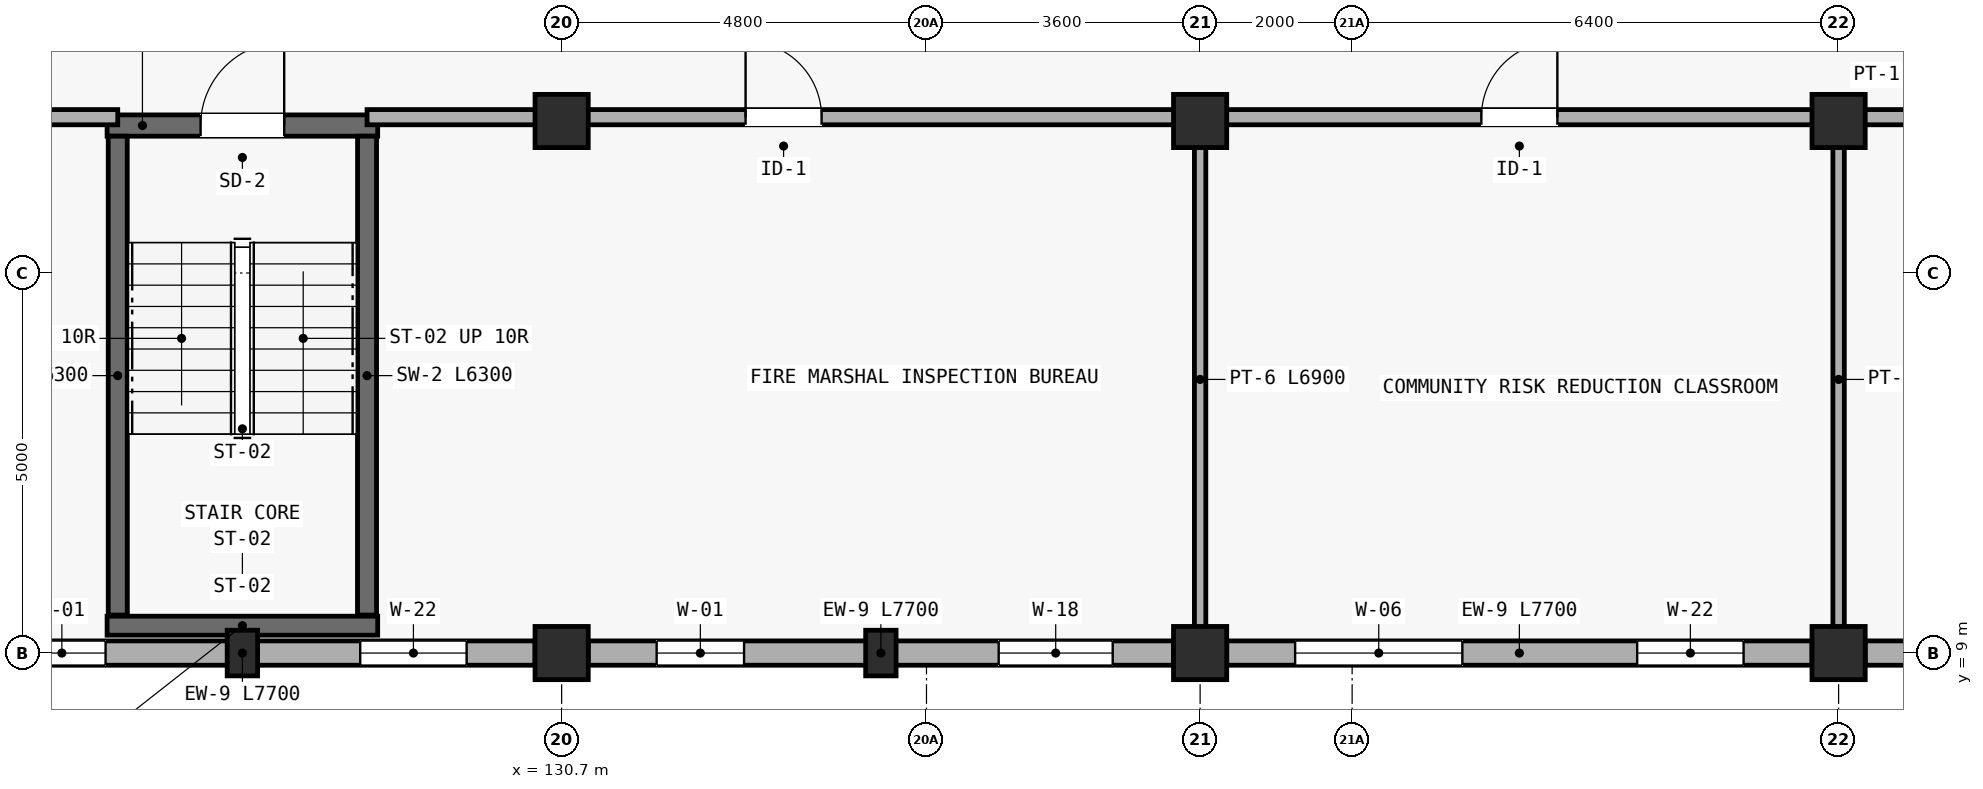
"""IFC4 building model, lengths in metres.
Left out: names, types, materials, properties, quantities, classifications, styles, units other than length and angle.
Written with IfcOpenShell. Run it as: python <this file> out.ifc"""

import sys

from ifc_helpers import new_model, si_unit, direction, frame, frame_2d, origin, origin_2d, place, context, subcontext, project, spatial, rectangle, extrude, element, fill, save


model = new_model("IFC4")
c1 = context("Model", 3, precision=1e-05, world=origin(), true_north=direction((0.0, 1.0)))
c2 = subcontext(c1, "Body", "Model", "MODEL_VIEW")
j1 = project(units=[si_unit("LENGTHUNIT", "METRE"), si_unit("PLANEANGLEUNIT", "RADIAN")], contexts=[c1])
p1 = place(None, origin())
s1 = spatial("IfcSite", under=j1, at=p1, CompositionType="ELEMENT")
p2 = place(p1, origin())
s2 = spatial("IfcBuilding", under=s1, at=p2, CompositionType="ELEMENT")
p3 = place(p2, frame((0.0, 0.0, 5.85)))
s3 = spatial("IfcBuildingStorey", under=s2, at=p3, CompositionType="ELEMENT", Elevation=5.85)
for number, where, z_axis, x_axis in (
    (1, (130.7, 9.0, 0.0), (0.0, 0.0, 1.0), (1.0, 0.0, 0.0)),
    (2, (130.7, 16.0, 0.0), (0.0, 0.0, 1.0), (1.0, 0.0, 0.0)),
    (3, (139.1, 9.0, 0.0), (0.0, 0.0, 1.0), (1.0, 0.0, 0.0)),
    (4, (139.1, 16.0, 0.0), (0.0, 0.0, 1.0), (1.0, 0.0, 0.0)),
    (5, (147.5, 9.0, 0.0), (0.0, 0.0, 1.0), (1.0, 0.0, 0.0)),
    (6, (147.5, 16.0, 0.0), (0.0, 0.0, 1.0), (1.0, 0.0, 0.0)),
):
    element("IfcColumn", number, at=place(p3, frame(where, z_axis=z_axis, x_axis=x_axis)), inside=s3, PredefinedType="COLUMN", context=c2, shape_type="SweptSolid", body=[
        extrude(rectangle(XDim=0.7, YDim=0.7, at=origin_2d()), origin(), (0.0, 0.0, 1.0), 3.45),
    ])
for number, where, z_axis, x_axis in (
    (7, (126.5, 9.0, 0.0), (0.0, 0.0, 1.0), (1.0, 0.0, 0.0)),
    (8, (134.9, 9.0, 0.0), (0.0, 0.0, 1.0), (1.0, 0.0, 0.0)),
):
    element("IfcColumn", number, at=place(p3, frame(where, z_axis=z_axis, x_axis=x_axis)), inside=s3, PredefinedType="PILASTER", context=c2, shape_type="SweptSolid", body=[
        extrude(rectangle(XDim=0.4, YDim=0.6, at=origin_2d()), origin(), (0.0, 0.0, 1.0), 3.45),
    ])
p4 = place(p3, frame((122.65, 9.0, 0.0), z_axis=(0.0, 0.0, 1.0), x_axis=(1.0, 0.0, 0.0)))
e9 = element("IfcWall", 9, at=p4, inside=s3, PredefinedType="STANDARD", context=c2, shape_type="SweptSolid", body=[
    extrude(rectangle(XDim=7.7, YDim=0.32, at=frame_2d((3.85, 0.0))), origin(), (0.0, 0.0, 1.0), 2.64),
])
p5 = place(p4, frame((0.9, 0.0, 0.75)))
e10 = element("IfcOpeningElement", 10, at=p5, cuts=e9, PredefinedType="OPENING", context=c2, shape_type="SweptSolid", body=[
    extrude(rectangle(XDim=1.15, YDim=1.45, at=frame_2d((0.575, 0.725))), frame((0.0, 0.17, 0.0), z_axis=(0.0, -1.0, 0.0), x_axis=(1.0, 0.0, 0.0)), (0.0, 0.0, 1.0), 0.34),
])
p6 = place(p4, frame((5.4, 0.0, 0.75)))
e11 = element("IfcOpeningElement", 11, at=p6, cuts=e9, PredefinedType="OPENING", context=c2, shape_type="SweptSolid", body=[
    extrude(rectangle(XDim=1.4, YDim=1.45, at=frame_2d((0.7, 0.725))), frame((0.0, 0.17, 0.0), z_axis=(0.0, -1.0, 0.0), x_axis=(1.0, 0.0, 0.0)), (0.0, 0.0, 1.0), 0.34),
])
p7 = place(p3, frame((131.05, 9.0, 0.0), z_axis=(0.0, 0.0, 1.0), x_axis=(1.0, 0.0, 0.0)))
e12 = element("IfcWall", 12, at=p7, inside=s3, PredefinedType="STANDARD", context=c2, shape_type="SweptSolid", body=[
    extrude(rectangle(XDim=7.7, YDim=0.32, at=frame_2d((3.85, 0.0))), origin(), (0.0, 0.0, 1.0), 2.64),
])
p8 = place(p7, frame((0.9, 0.0, 0.75)))
e13 = element("IfcOpeningElement", 13, at=p8, cuts=e12, PredefinedType="OPENING", context=c2, shape_type="SweptSolid", body=[
    extrude(rectangle(XDim=1.15, YDim=1.45, at=frame_2d((0.575, 0.725))), frame((0.0, 0.17, 0.0), z_axis=(0.0, -1.0, 0.0), x_axis=(1.0, 0.0, 0.0)), (0.0, 0.0, 1.0), 0.34),
])
p9 = place(p7, frame((5.4, 0.0, 0.75)))
e14 = element("IfcOpeningElement", 14, at=p9, cuts=e12, PredefinedType="OPENING", context=c2, shape_type="SweptSolid", body=[
    extrude(rectangle(XDim=1.5, YDim=1.4, at=frame_2d((0.75, 0.7))), frame((0.0, 0.17, 0.0), z_axis=(0.0, -1.0, 0.0), x_axis=(1.0, 0.0, 0.0)), (0.0, 0.0, 1.0), 0.34),
])
p10 = place(p3, frame((139.45, 9.0, 0.0), z_axis=(0.0, 0.0, 1.0), x_axis=(1.0, 0.0, 0.0)))
e15 = element("IfcWall", 15, at=p10, inside=s3, PredefinedType="STANDARD", context=c2, shape_type="SweptSolid", body=[
    extrude(rectangle(XDim=7.7, YDim=0.32, at=frame_2d((3.85, 0.0))), origin(), (0.0, 0.0, 1.0), 2.64),
])
p11 = place(p10, frame((0.9, 0.0, 0.75)))
e16 = element("IfcOpeningElement", 16, at=p11, cuts=e15, PredefinedType="OPENING", context=c2, shape_type="SweptSolid", body=[
    extrude(rectangle(XDim=2.2, YDim=1.45, at=frame_2d((1.1, 0.725))), frame((0.0, 0.17, 0.0), z_axis=(0.0, -1.0, 0.0), x_axis=(1.0, 0.0, 0.0)), (0.0, 0.0, 1.0), 0.34),
])
p12 = place(p10, frame((5.4, 0.0, 0.75)))
e17 = element("IfcOpeningElement", 17, at=p12, cuts=e15, PredefinedType="OPENING", context=c2, shape_type="SweptSolid", body=[
    extrude(rectangle(XDim=1.4, YDim=1.45, at=frame_2d((0.7, 0.725))), frame((0.0, 0.17, 0.0), z_axis=(0.0, -1.0, 0.0), x_axis=(1.0, 0.0, 0.0)), (0.0, 0.0, 1.0), 0.34),
])
p13 = place(p3, frame((147.85, 9.0, 0.0), z_axis=(0.0, 0.0, 1.0), x_axis=(1.0, 0.0, 0.0)))
e18 = element("IfcWall", 18, at=p13, inside=s3, PredefinedType="STANDARD", context=c2, shape_type="SweptSolid", body=[
    extrude(rectangle(XDim=7.7, YDim=0.32, at=frame_2d((3.85, 0.0))), origin(), (0.0, 0.0, 1.0), 2.64),
])
p14 = place(p13, frame((0.9, 0.0, 0.75)))
e19 = element("IfcOpeningElement", 19, at=p14, cuts=e18, PredefinedType="OPENING", context=c2, shape_type="SweptSolid", body=[
    extrude(rectangle(XDim=2.2, YDim=1.45, at=frame_2d((1.1, 0.725))), frame((0.0, 0.17, 0.0), z_axis=(0.0, -1.0, 0.0), x_axis=(1.0, 0.0, 0.0)), (0.0, 0.0, 1.0), 0.34),
])
p15 = place(p13, frame((5.4, 0.0, 0.75)))
e20 = element("IfcOpeningElement", 20, at=p15, cuts=e18, PredefinedType="OPENING", context=c2, shape_type="SweptSolid", body=[
    extrude(rectangle(XDim=1.5, YDim=1.4, at=frame_2d((0.75, 0.7))), frame((0.0, 0.17, 0.0), z_axis=(0.0, -1.0, 0.0), x_axis=(1.0, 0.0, 0.0)), (0.0, 0.0, 1.0), 0.34),
])
p16 = place(p3, frame((124.72, 15.94, 0.0), z_axis=(0.0, 0.0, 1.0), x_axis=(1.0, 0.0, 0.0)))
e21 = element("IfcWall", 21, at=p16, inside=s3, PredefinedType="SHEAR", context=c2, shape_type="SweptSolid", body=[
    extrude(rectangle(XDim=3.56, YDim=0.28, at=frame_2d((1.78, 0.0))), origin(), (0.0, 0.0, 1.0), 3.2),
])
p17 = place(p16, frame((1.23, 0.0, 0.0)))
e22 = element("IfcOpeningElement", 22, at=p17, cuts=e21, PredefinedType="OPENING", context=c2, shape_type="SweptSolid", body=[
    extrude(rectangle(XDim=1.1, YDim=2.15, at=frame_2d((0.55, 1.075))), frame((0.0, 0.15, 0.0), z_axis=(0.0, -1.0, 0.0), x_axis=(1.0, 0.0, 0.0)), (0.0, 0.0, 1.0), 0.3),
])
p18 = place(p3, frame((128.28, 9.36, 0.0), z_axis=(0.0, 0.0, 1.0), x_axis=(-1.0, 0.0, 0.0)))
e23 = element("IfcWall", 23, at=p18, inside=s3, PredefinedType="SHEAR", context=c2, shape_type="SweptSolid", body=[
    extrude(rectangle(XDim=3.56, YDim=0.25, at=frame_2d((1.78, 0.0))), origin(), (0.0, 0.0, 1.0), 3.2),
])
for number, where, z_axis, x_axis in (
    (24, (124.86, 15.8, 0.0), (0.0, 0.0, 1.0), (0.0, -1.0, 0.0)),
    (25, (128.14, 9.5, 0.0), (0.0, 0.0, 1.0), (0.0, 1.0, 0.0)),
):
    element("IfcWall", number, at=place(p3, frame(where, z_axis=z_axis, x_axis=x_axis)), inside=s3, PredefinedType="SHEAR", context=c2, shape_type="SweptSolid", body=[
        extrude(rectangle(XDim=6.3, YDim=0.25, at=frame_2d((3.15, 0.0))), origin(), (0.0, 0.0, 1.0), 3.2),
    ])
p19 = place(p3, frame((121.13, 16.05, 0.0), z_axis=(0.0, 0.0, 1.0), x_axis=(1.0, 0.0, 0.0)))
e26 = element("IfcWall", 26, at=p19, inside=s3, PredefinedType="PARTITIONING", context=c2, shape_type="SweptSolid", body=[
    extrude(rectangle(XDim=3.73, YDim=0.2, at=frame_2d((1.865, 0.0))), origin(), (0.0, 0.0, 1.0), 2.65),
])
p20 = place(p3, frame((128.14, 16.05, 0.0), z_axis=(0.0, 0.0, 1.0), x_axis=(1.0, 0.0, 0.0)))
e27 = element("IfcWall", 27, at=p20, inside=s3, PredefinedType="PARTITIONING", context=c2, shape_type="SweptSolid", body=[
    extrude(rectangle(XDim=10.96, YDim=0.2, at=frame_2d((5.48, 0.0))), origin(), (0.0, 0.0, 1.0), 2.65),
])
p21 = place(p20, frame((4.98, 0.0, 0.0)))
e28 = element("IfcOpeningElement", 28, at=p21, cuts=e27, PredefinedType="OPENING", context=c2, shape_type="SweptSolid", body=[
    extrude(rectangle(XDim=1.0, YDim=2.12, at=frame_2d((0.5, 1.06))), frame((0.0, 0.11, 0.0), z_axis=(0.0, -1.0, 0.0), x_axis=(1.0, 0.0, 0.0)), (0.0, 0.0, 1.0), 0.22),
])
p22 = place(p3, frame((139.1, 16.05, 0.0), z_axis=(0.0, 0.0, 1.0), x_axis=(1.0, 0.0, 0.0)))
e29 = element("IfcWall", 29, at=p22, inside=s3, PredefinedType="PARTITIONING", context=c2, shape_type="SweptSolid", body=[
    extrude(rectangle(XDim=8.4, YDim=0.2, at=frame_2d((4.2, 0.0))), origin(), (0.0, 0.0, 1.0), 2.65),
])
p23 = place(p22, frame((3.7, 0.0, 0.0)))
e30 = element("IfcOpeningElement", 30, at=p23, cuts=e29, PredefinedType="OPENING", context=c2, shape_type="SweptSolid", body=[
    extrude(rectangle(XDim=1.0, YDim=2.12, at=frame_2d((0.5, 1.06))), frame((0.0, 0.11, 0.0), z_axis=(0.0, -1.0, 0.0), x_axis=(1.0, 0.0, 0.0)), (0.0, 0.0, 1.0), 0.22),
])
p24 = place(p3, frame((147.5, 16.05, 0.0), z_axis=(0.0, 0.0, 1.0), x_axis=(1.0, 0.0, 0.0)))
e31 = element("IfcWall", 31, at=p24, inside=s3, PredefinedType="PARTITIONING", context=c2, shape_type="SweptSolid", body=[
    extrude(rectangle(XDim=4.3, YDim=0.2, at=frame_2d((2.15, 0.0))), origin(), (0.0, 0.0, 1.0), 2.65),
])
for number, where, z_axis, x_axis in (
    (32, (139.1, 9.15, 0.0), (0.0, 0.0, 1.0), (0.0, 1.0, 0.0)),
    (33, (147.5, 9.15, 0.0), (0.0, 0.0, 1.0), (0.0, 1.0, 0.0)),
):
    element("IfcWall", number, at=place(p3, frame(where, z_axis=z_axis, x_axis=x_axis)), inside=s3, PredefinedType="PARTITIONING", context=c2, shape_type="SweptSolid", body=[
        extrude(rectangle(XDim=6.9, YDim=0.15, at=frame_2d((3.45, 0.0))), origin(), (0.0, 0.0, 1.0), 2.65),
    ])
p25 = place(p5, origin())
e34 = element("IfcWindow", 34, at=p25, inside=s3, PartitioningType="SINGLE_PANEL", PredefinedType="WINDOW", context=c2, shape_type="SweptSolid", body=[
    extrude(rectangle(XDim=1.15, YDim=1.45, at=frame_2d((0.575, 0.725))), frame((0.0, 0.03, 0.0), z_axis=(0.0, -1.0, 0.0), x_axis=(1.0, 0.0, 0.0)), (0.0, 0.0, 1.0), 0.06),
])
fill(e10, e34)
p26 = place(p6, origin())
e35 = element("IfcWindow", 35, at=p26, inside=s3, PartitioningType="DOUBLE_PANEL_VERTICAL", PredefinedType="WINDOW", context=c2, shape_type="SweptSolid", body=[
    extrude(rectangle(XDim=1.4, YDim=1.45, at=frame_2d((0.7, 0.725))), frame((0.0, 0.03, 0.0), z_axis=(0.0, -1.0, 0.0), x_axis=(1.0, 0.0, 0.0)), (0.0, 0.0, 1.0), 0.06),
])
fill(e11, e35)
p27 = place(p8, origin())
e36 = element("IfcWindow", 36, at=p27, inside=s3, PartitioningType="SINGLE_PANEL", PredefinedType="WINDOW", context=c2, shape_type="SweptSolid", body=[
    extrude(rectangle(XDim=1.15, YDim=1.45, at=frame_2d((0.575, 0.725))), frame((0.0, 0.03, 0.0), z_axis=(0.0, -1.0, 0.0), x_axis=(1.0, 0.0, 0.0)), (0.0, 0.0, 1.0), 0.06),
])
fill(e13, e36)
p28 = place(p9, origin())
e37 = element("IfcWindow", 37, at=p28, inside=s3, PartitioningType="DOUBLE_PANEL_VERTICAL", PredefinedType="WINDOW", context=c2, shape_type="SweptSolid", body=[
    extrude(rectangle(XDim=1.5, YDim=1.4, at=frame_2d((0.75, 0.7))), frame((0.0, 0.03, 0.0), z_axis=(0.0, -1.0, 0.0), x_axis=(1.0, 0.0, 0.0)), (0.0, 0.0, 1.0), 0.06),
])
fill(e14, e37)
p29 = place(p11, origin())
e38 = element("IfcWindow", 38, at=p29, inside=s3, PartitioningType="TRIPLE_PANEL_VERTICAL", PredefinedType="WINDOW", context=c2, shape_type="SweptSolid", body=[
    extrude(rectangle(XDim=2.2, YDim=1.45, at=frame_2d((1.1, 0.725))), frame((0.0, 0.03, 0.0), z_axis=(0.0, -1.0, 0.0), x_axis=(1.0, 0.0, 0.0)), (0.0, 0.0, 1.0), 0.06),
])
fill(e16, e38)
p30 = place(p12, origin())
e39 = element("IfcWindow", 39, at=p30, inside=s3, PartitioningType="DOUBLE_PANEL_VERTICAL", PredefinedType="WINDOW", context=c2, shape_type="SweptSolid", body=[
    extrude(rectangle(XDim=1.4, YDim=1.45, at=frame_2d((0.7, 0.725))), frame((0.0, 0.03, 0.0), z_axis=(0.0, -1.0, 0.0), x_axis=(1.0, 0.0, 0.0)), (0.0, 0.0, 1.0), 0.06),
])
fill(e17, e39)
p31 = place(p17, origin())
e40 = element("IfcDoor", 40, at=p31, inside=s3, OperationType="SINGLE_SWING_RIGHT", PredefinedType="DOOR", context=c2, shape_type="SweptSolid", body=[
    extrude(rectangle(XDim=1.1, YDim=2.15, at=frame_2d((0.55, 1.075))), frame((0.0, 0.025, 0.0), z_axis=(0.0, -1.0, 0.0), x_axis=(1.0, 0.0, 0.0)), (0.0, 0.0, 1.0), 0.05),
])
fill(e22, e40)
p32 = place(p21, origin())
e41 = element("IfcDoor", 41, at=p32, inside=s3, OperationType="SINGLE_SWING_LEFT", PredefinedType="DOOR", context=c2, shape_type="SweptSolid", body=[
    extrude(rectangle(XDim=1.0, YDim=2.12, at=frame_2d((0.5, 1.06))), frame((0.0, 0.025, 0.0), z_axis=(0.0, -1.0, 0.0), x_axis=(1.0, 0.0, 0.0)), (0.0, 0.0, 1.0), 0.05),
])
fill(e28, e41)
p33 = place(p23, origin())
e42 = element("IfcDoor", 42, at=p33, inside=s3, OperationType="SINGLE_SWING_RIGHT", PredefinedType="DOOR", context=c2, shape_type="SweptSolid", body=[
    extrude(rectangle(XDim=1.0, YDim=2.12, at=frame_2d((0.5, 1.06))), frame((0.0, 0.025, 0.0), z_axis=(0.0, -1.0, 0.0), x_axis=(1.0, 0.0, 0.0)), (0.0, 0.0, 1.0), 0.05),
])
fill(e30, e42)
save(model, sys.argv[1])
